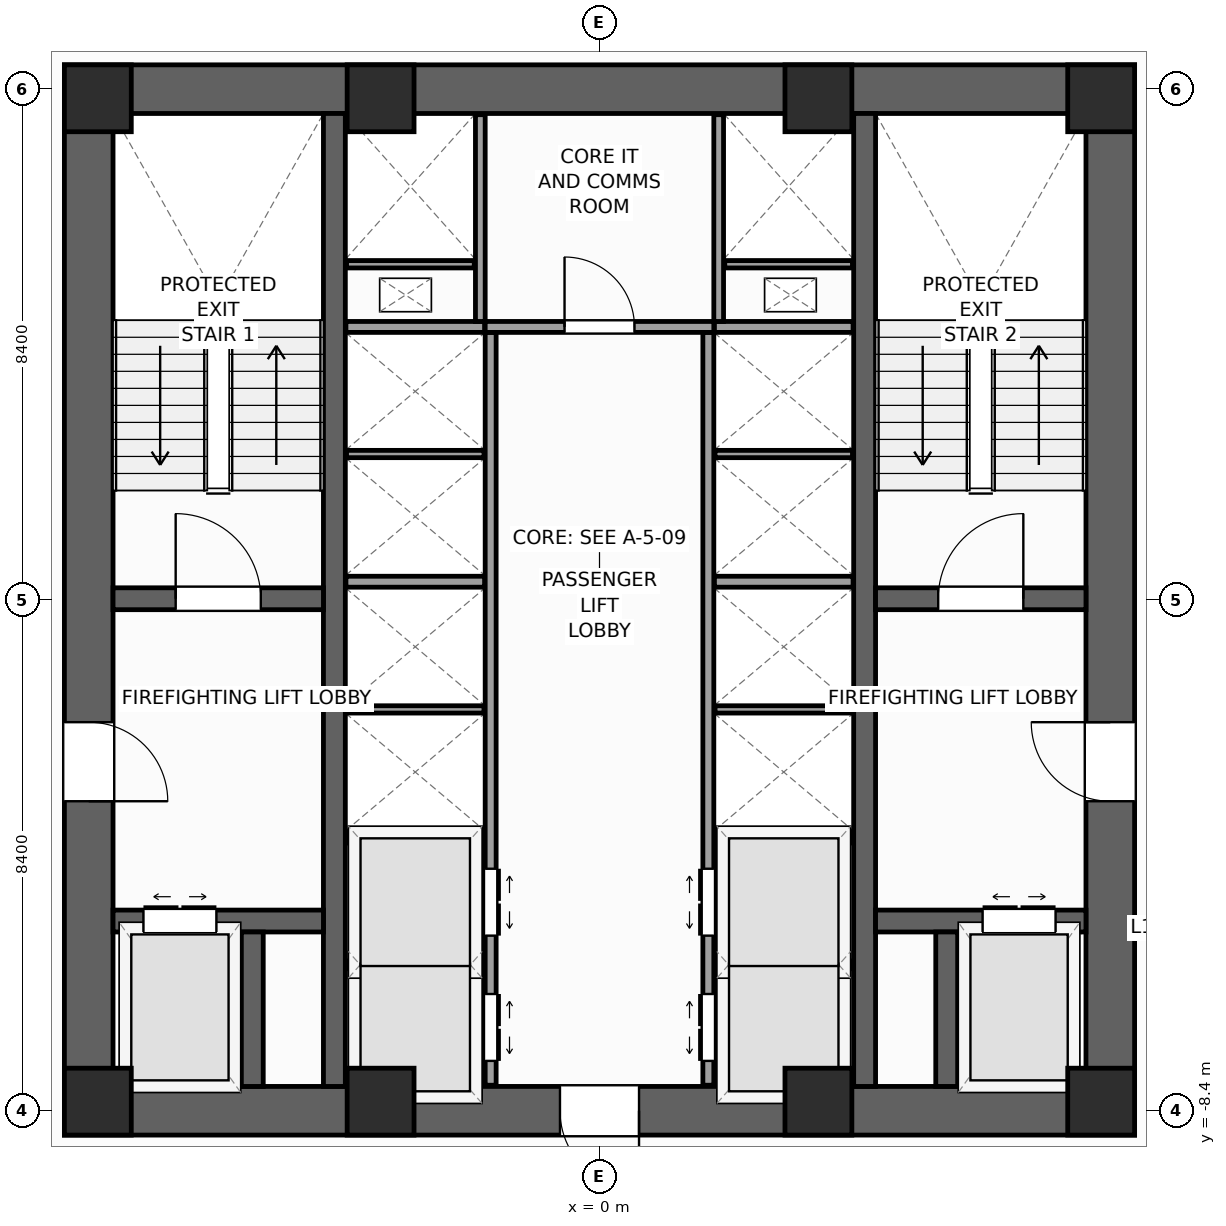
"""IFC4 building model, lengths in metres.
Left out: names, types, materials, properties, quantities, classifications, styles, units other than length and angle.
Written with IfcOpenShell. Run it as: python <this file> out.ifc"""

import sys

from ifc_helpers import new_model, si_unit, direction, frame, frame_2d, origin, origin_2d, place, context, subcontext, project, spatial, rectangle, extrude, source, transform, mapped, element, fill, save


model = new_model("IFC4")
c1 = context("Model", 3, precision=1e-05, world=origin(), true_north=direction((0.0, 1.0)))
c2 = subcontext(c1, "Body", "Model", "MODEL_VIEW")
j1 = project(units=[si_unit("LENGTHUNIT", "METRE"), si_unit("PLANEANGLEUNIT", "RADIAN")], contexts=[c1])
p1 = place(None, origin())
s1 = spatial("IfcSite", under=j1, at=p1, CompositionType="ELEMENT")
p2 = place(p1, origin())
s2 = spatial("IfcBuilding", under=s1, at=p2, CompositionType="ELEMENT")
p3 = place(p2, frame((0.0, 0.0, 58.0)))
s3 = spatial("IfcBuildingStorey", under=s2, at=p3, CompositionType="ELEMENT", Elevation=58.0)
p4 = place(p3, frame((-8.8, -8.4, 0.0), z_axis=(0.0, 0.0, 1.0), x_axis=(1.0, 0.0, 0.0)))
e1 = element("IfcWall", 1, at=p4, inside=s3, PredefinedType="SHEAR", context=c2, shape_type="SweptSolid", body=[
    extrude(rectangle(XDim=17.6, YDim=0.8, at=frame_2d((8.8, 0.0))), origin(), (0.0, 0.0, 1.0), 4.0),
])
p5 = place(p4, frame((8.15, 0.0, 0.0)))
e2 = element("IfcOpeningElement", 2, at=p5, cuts=e1, PredefinedType="OPENING", context=c2, shape_type="SweptSolid", body=[
    extrude(rectangle(XDim=1.3, YDim=2.2, at=frame_2d((0.65, 1.1))), frame((0.0, 0.41, 0.0), z_axis=(0.0, -1.0, 0.0), x_axis=(1.0, 0.0, 0.0)), (0.0, 0.0, 1.0), 0.82),
])
p6 = place(p3, frame((-8.8, 8.4, 0.0), z_axis=(0.0, 0.0, 1.0), x_axis=(1.0, 0.0, 0.0)))
e3 = element("IfcWall", 3, at=p6, inside=s3, PredefinedType="SHEAR", context=c2, shape_type="SweptSolid", body=[
    extrude(rectangle(XDim=17.6, YDim=0.8, at=frame_2d((8.8, 0.0))), origin(), (0.0, 0.0, 1.0), 4.0),
])
p7 = place(p3, frame((-8.4, -8.0, 0.0), z_axis=(0.0, 0.0, 1.0), x_axis=(0.0, 1.0, 0.0)))
e4 = element("IfcWall", 4, at=p7, inside=s3, PredefinedType="SHEAR", context=c2, shape_type="SweptSolid", body=[
    extrude(rectangle(XDim=16.0, YDim=0.8, at=frame_2d((8.0, 0.0))), origin(), (0.0, 0.0, 1.0), 4.0),
])
p8 = place(p7, frame((4.69, 0.0, 0.0)))
e5 = element("IfcOpeningElement", 5, at=p8, cuts=e4, PredefinedType="OPENING", context=c2, shape_type="SweptSolid", body=[
    extrude(rectangle(XDim=1.3, YDim=2.2, at=frame_2d((0.65, 1.1))), frame((0.0, 0.41, 0.0), z_axis=(0.0, -1.0, 0.0), x_axis=(1.0, 0.0, 0.0)), (0.0, 0.0, 1.0), 0.82),
])
p9 = place(p3, frame((8.4, -8.0, 0.0), z_axis=(0.0, 0.0, 1.0), x_axis=(0.0, 1.0, 0.0)))
e6 = element("IfcWall", 6, at=p9, inside=s3, PredefinedType="SHEAR", context=c2, shape_type="SweptSolid", body=[
    extrude(rectangle(XDim=16.0, YDim=0.8, at=frame_2d((8.0, 0.0))), origin(), (0.0, 0.0, 1.0), 4.0),
])
p10 = place(p9, frame((4.69, 0.0, 0.0)))
e7 = element("IfcOpeningElement", 7, at=p10, cuts=e6, PredefinedType="OPENING", context=c2, shape_type="SweptSolid", body=[
    extrude(rectangle(XDim=1.3, YDim=2.2, at=frame_2d((0.65, 1.1))), frame((0.0, 0.41, 0.0), z_axis=(0.0, -1.0, 0.0), x_axis=(1.0, 0.0, 0.0)), (0.0, 0.0, 1.0), 0.82),
])
for number, where, z_axis, x_axis in (
    (8, (-4.36, -8.0, 0.0), (0.0, 0.0, 1.0), (0.0, 1.0, 0.0)),
    (9, (4.36, -8.0, 0.0), (0.0, 0.0, 1.0), (0.0, 1.0, 0.0)),
):
    element("IfcWall", number, at=place(p3, frame(where, z_axis=z_axis, x_axis=x_axis)), inside=s3, PredefinedType="SHEAR", context=c2, shape_type="SweptSolid", body=[
        extrude(rectangle(XDim=16.0, YDim=0.36, at=frame_2d((8.0, 0.0))), origin(), (0.0, 0.0, 1.0), 4.0),
    ])
p11 = place(p3, frame((-8.0, 0.02, 0.0), z_axis=(0.0, 0.0, 1.0), x_axis=(1.0, 0.0, 0.0)))
e10 = element("IfcWall", 10, at=p11, inside=s3, PredefinedType="SHEAR", context=c2, shape_type="SweptSolid", body=[
    extrude(rectangle(XDim=3.46, YDim=0.36, at=frame_2d((1.73, 0.0))), origin(), (0.0, 0.0, 1.0), 4.0),
])
p12 = place(p11, frame((1.03, 0.0, 0.0)))
e11 = element("IfcOpeningElement", 11, at=p12, cuts=e10, PredefinedType="OPENING", context=c2, shape_type="SweptSolid", body=[
    extrude(rectangle(XDim=1.4, YDim=2.2, at=frame_2d((0.7, 1.1))), frame((0.0, 0.19, 0.0), z_axis=(0.0, -1.0, 0.0), x_axis=(1.0, 0.0, 0.0)), (0.0, 0.0, 1.0), 0.38),
])
p13 = place(p3, frame((4.54, 0.02, 0.0), z_axis=(0.0, 0.0, 1.0), x_axis=(1.0, 0.0, 0.0)))
e12 = element("IfcWall", 12, at=p13, inside=s3, PredefinedType="SHEAR", context=c2, shape_type="SweptSolid", body=[
    extrude(rectangle(XDim=3.46, YDim=0.36, at=frame_2d((1.73, 0.0))), origin(), (0.0, 0.0, 1.0), 4.0),
])
p14 = place(p13, frame((1.03, 0.0, 0.0)))
e13 = element("IfcOpeningElement", 13, at=p14, cuts=e12, PredefinedType="OPENING", context=c2, shape_type="SweptSolid", body=[
    extrude(rectangle(XDim=1.4, YDim=2.2, at=frame_2d((0.7, 1.1))), frame((0.0, 0.19, 0.0), z_axis=(0.0, -1.0, 0.0), x_axis=(1.0, 0.0, 0.0)), (0.0, 0.0, 1.0), 0.38),
])
p15 = place(p3, frame((-8.0, -5.28, 0.0), z_axis=(0.0, 0.0, 1.0), x_axis=(1.0, 0.0, 0.0)))
e14 = element("IfcWall", 14, at=p15, inside=s3, PredefinedType="SHEAR", context=c2, shape_type="SweptSolid", body=[
    extrude(rectangle(XDim=3.46, YDim=0.36, at=frame_2d((1.73, 0.0))), origin(), (0.0, 0.0, 1.0), 4.0),
])
p16 = place(p15, frame((0.5, 0.0, 0.0)))
e15 = element("IfcOpeningElement", 15, at=p16, cuts=e14, PredefinedType="OPENING", context=c2, shape_type="SweptSolid", body=[
    extrude(rectangle(XDim=1.2, YDim=2.25, at=frame_2d((0.6, 1.125))), frame((0.0, 0.19, 0.0), z_axis=(0.0, -1.0, 0.0), x_axis=(1.0, 0.0, 0.0)), (0.0, 0.0, 1.0), 0.38),
])
p17 = place(p3, frame((4.54, -5.28, 0.0), z_axis=(0.0, 0.0, 1.0), x_axis=(1.0, 0.0, 0.0)))
e16 = element("IfcWall", 16, at=p17, inside=s3, PredefinedType="SHEAR", context=c2, shape_type="SweptSolid", body=[
    extrude(rectangle(XDim=3.46, YDim=0.36, at=frame_2d((1.73, 0.0))), origin(), (0.0, 0.0, 1.0), 4.0),
])
p18 = place(p17, frame((1.76, 0.0, 0.0)))
e17 = element("IfcOpeningElement", 17, at=p18, cuts=e16, PredefinedType="OPENING", context=c2, shape_type="SweptSolid", body=[
    extrude(rectangle(XDim=1.2, YDim=2.25, at=frame_2d((0.6, 1.125))), frame((0.0, 0.19, 0.0), z_axis=(0.0, -1.0, 0.0), x_axis=(1.0, 0.0, 0.0)), (0.0, 0.0, 1.0), 0.38),
])
for number, where, z_axis, x_axis in (
    (18, (-5.71, -8.0, 0.0), (0.0, 0.0, 1.0), (0.0, 1.0, 0.0)),
    (19, (5.71, -8.0, 0.0), (0.0, 0.0, 1.0), (0.0, 1.0, 0.0)),
):
    element("IfcWall", number, at=place(p3, frame(where, z_axis=z_axis, x_axis=x_axis)), inside=s3, PredefinedType="SHEAR", context=c2, shape_type="SweptSolid", body=[
        extrude(rectangle(XDim=2.54, YDim=0.36, at=frame_2d((1.27, 0.0))), origin(), (0.0, 0.0, 1.0), 4.0),
    ])
m1 = source(origin(), c2, "Body", "SweptSolid", [
    extrude(rectangle(XDim=1.1, YDim=1.1, at=origin_2d()), origin(), (0.0, 0.0, 1.0), 4.0),
])
for number, where, z_axis, x_axis in (
    (20, (-8.25, -8.25, 0.0), (0.0, 0.0, 1.0), (1.0, 0.0, 0.0)),
    (21, (8.25, -8.25, 0.0), (0.0, 0.0, 1.0), (1.0, 0.0, 0.0)),
    (22, (8.25, 8.25, 0.0), (0.0, 0.0, 1.0), (1.0, 0.0, 0.0)),
    (23, (-8.25, 8.25, 0.0), (0.0, 0.0, 1.0), (1.0, 0.0, 0.0)),
    (24, (-3.6, -8.25, 0.0), (0.0, 0.0, 1.0), (1.0, 0.0, 0.0)),
    (25, (3.6, -8.25, 0.0), (0.0, 0.0, 1.0), (1.0, 0.0, 0.0)),
    (26, (-3.6, 8.25, 0.0), (0.0, 0.0, 1.0), (1.0, 0.0, 0.0)),
    (27, (3.6, 8.25, 0.0), (0.0, 0.0, 1.0), (1.0, 0.0, 0.0)),
):
    element("IfcColumn", number, at=place(p3, frame(where, z_axis=z_axis, x_axis=x_axis)), inside=s3, PredefinedType="PILASTER", context=c2, shape_type="MappedRepresentation", body=[
        mapped(m1, transform((0.0, 0.0, 0.0), scale=1.0)),
    ])
p19 = place(p3, frame((-1.79, -7.98, 0.0), z_axis=(0.0, 0.0, 1.0), x_axis=(0.0, 1.0, 0.0)))
e28 = element("IfcWall", 28, at=p19, inside=s3, PredefinedType="PARTITIONING", context=c2, shape_type="SweptSolid", body=[
    extrude(rectangle(XDim=12.38, YDim=0.18, at=frame_2d((6.19, 0.0))), origin(), (0.0, 0.0, 1.0), 3.72),
])
p20 = place(p19, frame((0.4, 0.0, 0.0)))
e29 = element("IfcOpeningElement", 29, at=p20, cuts=e28, PredefinedType="OPENING", context=c2, shape_type="SweptSolid", body=[
    extrude(rectangle(XDim=1.1, YDim=2.2, at=frame_2d((0.55, 1.1))), frame((0.0, 0.1, 0.0), z_axis=(0.0, -1.0, 0.0), x_axis=(1.0, 0.0, 0.0)), (0.0, 0.0, 1.0), 0.2),
])
p21 = place(p19, frame((2.46, 0.0, 0.0)))
e30 = element("IfcOpeningElement", 30, at=p21, cuts=e28, PredefinedType="OPENING", context=c2, shape_type="SweptSolid", body=[
    extrude(rectangle(XDim=1.1, YDim=2.2, at=frame_2d((0.55, 1.1))), frame((0.0, 0.1, 0.0), z_axis=(0.0, -1.0, 0.0), x_axis=(1.0, 0.0, 0.0)), (0.0, 0.0, 1.0), 0.2),
])
p22 = place(p3, frame((1.79, -7.98, 0.0), z_axis=(0.0, 0.0, 1.0), x_axis=(0.0, 1.0, 0.0)))
e31 = element("IfcWall", 31, at=p22, inside=s3, PredefinedType="PARTITIONING", context=c2, shape_type="SweptSolid", body=[
    extrude(rectangle(XDim=12.38, YDim=0.18, at=frame_2d((6.19, 0.0))), origin(), (0.0, 0.0, 1.0), 3.72),
])
p23 = place(p22, frame((0.4, 0.0, 0.0)))
e32 = element("IfcOpeningElement", 32, at=p23, cuts=e31, PredefinedType="OPENING", context=c2, shape_type="SweptSolid", body=[
    extrude(rectangle(XDim=1.1, YDim=2.2, at=frame_2d((0.55, 1.1))), frame((0.0, 0.1, 0.0), z_axis=(0.0, -1.0, 0.0), x_axis=(1.0, 0.0, 0.0)), (0.0, 0.0, 1.0), 0.2),
])
p24 = place(p22, frame((2.46, 0.0, 0.0)))
e33 = element("IfcOpeningElement", 33, at=p24, cuts=e31, PredefinedType="OPENING", context=c2, shape_type="SweptSolid", body=[
    extrude(rectangle(XDim=1.1, YDim=2.2, at=frame_2d((0.55, 1.1))), frame((0.0, 0.1, 0.0), z_axis=(0.0, -1.0, 0.0), x_axis=(1.0, 0.0, 0.0)), (0.0, 0.0, 1.0), 0.2),
])
p25 = place(p3, frame((-1.88, 4.49, 0.0), z_axis=(0.0, 0.0, 1.0), x_axis=(1.0, 0.0, 0.0)))
e34 = element("IfcWall", 34, at=p25, inside=s3, PredefinedType="PARTITIONING", context=c2, shape_type="SweptSolid", body=[
    extrude(rectangle(XDim=3.76, YDim=0.18, at=frame_2d((1.88, 0.0))), origin(), (0.0, 0.0, 1.0), 3.72),
])
p26 = place(p25, frame((1.305, 0.0, 0.0)))
e35 = element("IfcOpeningElement", 35, at=p26, cuts=e34, PredefinedType="OPENING", context=c2, shape_type="SweptSolid", body=[
    extrude(rectangle(XDim=1.15, YDim=2.25, at=frame_2d((0.575, 1.125))), frame((0.0, 0.1, 0.0), z_axis=(0.0, -1.0, 0.0), x_axis=(1.0, 0.0, 0.0)), (0.0, 0.0, 1.0), 0.2),
])
for number, where, z_axis, x_axis in (
    (36, (-4.17, -3.9, 0.0), (0.0, 0.0, 1.0), (1.0, 0.0, 0.0)),
    (37, (1.89, -3.9, 0.0), (0.0, 0.0, 1.0), (1.0, 0.0, 0.0)),
    (38, (-4.17, 0.3, 0.0), (0.0, 0.0, 1.0), (1.0, 0.0, 0.0)),
    (39, (1.89, 0.3, 0.0), (0.0, 0.0, 1.0), (1.0, 0.0, 0.0)),
    (40, (-4.17, 4.49, 0.0), (0.0, 0.0, 1.0), (1.0, 0.0, 0.0)),
    (41, (1.89, 4.49, 0.0), (0.0, 0.0, 1.0), (1.0, 0.0, 0.0)),
):
    element("IfcWall", number, at=place(p3, frame(where, z_axis=z_axis, x_axis=x_axis)), inside=s3, PredefinedType="PARTITIONING", context=c2, shape_type="SweptSolid", body=[
        extrude(rectangle(XDim=2.28, YDim=0.18, at=frame_2d((1.14, 0.0))), origin(), (0.0, 0.0, 1.0), 3.72),
    ])
for number, where, z_axis, x_axis in (
    (42, (-4.16, -6.0, 0.0), (0.0, 0.0, 1.0), (1.0, 0.0, 0.0)),
    (43, (1.9, -6.0, 0.0), (0.0, 0.0, 1.0), (1.0, 0.0, 0.0)),
    (44, (-4.16, -1.8, 0.0), (0.0, 0.0, 1.0), (1.0, 0.0, 0.0)),
    (45, (1.9, -1.8, 0.0), (0.0, 0.0, 1.0), (1.0, 0.0, 0.0)),
    (46, (-4.16, 2.4, 0.0), (0.0, 0.0, 1.0), (1.0, 0.0, 0.0)),
    (47, (1.9, 2.4, 0.0), (0.0, 0.0, 1.0), (1.0, 0.0, 0.0)),
):
    element("IfcWall", number, at=place(p3, frame(where, z_axis=z_axis, x_axis=x_axis)), inside=s3, PredefinedType="PARTITIONING", context=c2, shape_type="SweptSolid", body=[
        extrude(rectangle(XDim=2.26, YDim=0.12, at=frame_2d((1.13, 0.0))), origin(), (0.0, 0.0, 1.0), 3.72),
    ])
for number, where, z_axis, x_axis in (
    (48, (-1.96, 4.58, 0.0), (0.0, 0.0, 1.0), (0.0, 1.0, 0.0)),
    (49, (1.96, 4.58, 0.0), (0.0, 0.0, 1.0), (0.0, 1.0, 0.0)),
):
    element("IfcWall", number, at=place(p3, frame(where, z_axis=z_axis, x_axis=x_axis)), inside=s3, PredefinedType="PARTITIONING", context=c2, shape_type="SweptSolid", body=[
        extrude(rectangle(XDim=3.4, YDim=0.16, at=frame_2d((1.7, 0.0))), origin(), (0.0, 0.0, 1.0), 3.72),
    ])
for number, where, z_axis, x_axis in (
    (50, (-4.16, 5.52, 0.0), (0.0, 0.0, 1.0), (1.0, 0.0, 0.0)),
    (51, (2.06, 5.52, 0.0), (0.0, 0.0, 1.0), (1.0, 0.0, 0.0)),
):
    element("IfcWall", number, at=place(p3, frame(where, z_axis=z_axis, x_axis=x_axis)), inside=s3, PredefinedType="PARTITIONING", context=c2, shape_type="SweptSolid", body=[
        extrude(rectangle(XDim=2.1, YDim=0.12, at=frame_2d((1.05, 0.0))), origin(), (0.0, 0.0, 1.0), 3.72),
    ])
m2 = source(origin(), c2, "Body", "SweptSolid", [
    extrude(rectangle(XDim=1.4, YDim=2.2, at=frame_2d((0.7, 1.1))), frame((0.0, 0.025, 0.0), z_axis=(0.0, -1.0, 0.0), x_axis=(1.0, 0.0, 0.0)), (0.0, 0.0, 1.0), 0.05),
])
p27 = place(p12, origin())
e52 = element("IfcDoor", 52, at=p27, inside=s3, OperationType="SINGLE_SWING_LEFT", PredefinedType="DOOR", context=c2, shape_type="MappedRepresentation", body=[
    mapped(m2, transform((0.0, 0.0, 0.0), scale=1.0)),
])
fill(e11, e52)
p28 = place(p14, origin())
e53 = element("IfcDoor", 53, at=p28, inside=s3, OperationType="SINGLE_SWING_RIGHT", PredefinedType="DOOR", context=c2, shape_type="MappedRepresentation", body=[
    mapped(m2, transform((0.0, 0.0, 0.0), scale=1.0)),
])
fill(e13, e53)
m3 = source(origin(), c2, "Body", "SweptSolid", [
    extrude(rectangle(XDim=1.3, YDim=2.2, at=frame_2d((0.65, 1.1))), frame((0.0, 0.025, 0.0), z_axis=(0.0, -1.0, 0.0), x_axis=(1.0, 0.0, 0.0)), (0.0, 0.0, 1.0), 0.05),
])
p29 = place(p8, frame((1.3, 0.0, 0.0), z_axis=(0.0, 0.0, 1.0), x_axis=(-1.0, 0.0, 0.0)))
e54 = element("IfcDoor", 54, at=p29, inside=s3, OperationType="SINGLE_SWING_LEFT", PredefinedType="DOOR", context=c2, shape_type="MappedRepresentation", body=[
    mapped(m3, transform((0.0, 0.0, 0.0), scale=1.0)),
])
fill(e5, e54)
p30 = place(p10, origin())
e55 = element("IfcDoor", 55, at=p30, inside=s3, OperationType="SINGLE_SWING_RIGHT", PredefinedType="DOOR", context=c2, shape_type="MappedRepresentation", body=[
    mapped(m3, transform((0.0, 0.0, 0.0), scale=1.0)),
])
fill(e7, e55)
p31 = place(p5, frame((1.3, 0.0, 0.0), z_axis=(0.0, 0.0, 1.0), x_axis=(-1.0, 0.0, 0.0)))
e56 = element("IfcDoor", 56, at=p31, inside=s3, OperationType="SINGLE_SWING_RIGHT", PredefinedType="DOOR", context=c2, shape_type="MappedRepresentation", body=[
    mapped(m3, transform((0.0, 0.0, 0.0), scale=1.0)),
])
fill(e2, e56)
m4 = source(origin(), c2, "Body", "SweptSolid", [
    extrude(rectangle(XDim=1.2, YDim=2.25, at=frame_2d((0.6, 1.125))), frame((0.0, 0.025, 0.0), z_axis=(0.0, -1.0, 0.0), x_axis=(1.0, 0.0, 0.0)), (0.0, 0.0, 1.0), 0.05),
])
p32 = place(p16, origin())
e57 = element("IfcDoor", 57, at=p32, inside=s3, OperationType="DOUBLE_DOOR_SLIDING", PredefinedType="DOOR", context=c2, shape_type="MappedRepresentation", body=[
    mapped(m4, transform((0.0, 0.0, 0.0), scale=1.0)),
])
fill(e15, e57)
p33 = place(p18, origin())
e58 = element("IfcDoor", 58, at=p33, inside=s3, OperationType="DOUBLE_DOOR_SLIDING", PredefinedType="DOOR", context=c2, shape_type="MappedRepresentation", body=[
    mapped(m4, transform((0.0, 0.0, 0.0), scale=1.0)),
])
fill(e17, e58)
m5 = source(origin(), c2, "Body", "SweptSolid", [
    extrude(rectangle(XDim=1.1, YDim=2.2, at=frame_2d((0.55, 1.1))), frame((0.0, 0.025, 0.0), z_axis=(0.0, -1.0, 0.0), x_axis=(1.0, 0.0, 0.0)), (0.0, 0.0, 1.0), 0.05),
])
p34 = place(p20, frame((1.1, 0.0, 0.0), z_axis=(0.0, 0.0, 1.0), x_axis=(-1.0, 0.0, 0.0)))
e59 = element("IfcDoor", 59, at=p34, inside=s3, OperationType="DOUBLE_DOOR_SLIDING", PredefinedType="DOOR", context=c2, shape_type="MappedRepresentation", body=[
    mapped(m5, transform((0.0, 0.0, 0.0), scale=1.0)),
])
fill(e29, e59)
p35 = place(p21, frame((1.1, 0.0, 0.0), z_axis=(0.0, 0.0, 1.0), x_axis=(-1.0, 0.0, 0.0)))
e60 = element("IfcDoor", 60, at=p35, inside=s3, OperationType="DOUBLE_DOOR_SLIDING", PredefinedType="DOOR", context=c2, shape_type="MappedRepresentation", body=[
    mapped(m5, transform((0.0, 0.0, 0.0), scale=1.0)),
])
fill(e30, e60)
p36 = place(p23, origin())
e61 = element("IfcDoor", 61, at=p36, inside=s3, OperationType="DOUBLE_DOOR_SLIDING", PredefinedType="DOOR", context=c2, shape_type="MappedRepresentation", body=[
    mapped(m5, transform((0.0, 0.0, 0.0), scale=1.0)),
])
fill(e32, e61)
p37 = place(p24, origin())
e62 = element("IfcDoor", 62, at=p37, inside=s3, OperationType="DOUBLE_DOOR_SLIDING", PredefinedType="DOOR", context=c2, shape_type="MappedRepresentation", body=[
    mapped(m5, transform((0.0, 0.0, 0.0), scale=1.0)),
])
fill(e33, e62)
m6 = source(origin(), c2, "Body", "SweptSolid", [
    extrude(rectangle(XDim=1.15, YDim=2.25, at=frame_2d((0.575, 1.125))), frame((0.0, 0.025, 0.0), z_axis=(0.0, -1.0, 0.0), x_axis=(1.0, 0.0, 0.0)), (0.0, 0.0, 1.0), 0.05),
])
p38 = place(p26, origin())
e63 = element("IfcDoor", 63, at=p38, inside=s3, OperationType="SINGLE_SWING_LEFT", PredefinedType="DOOR", context=c2, shape_type="MappedRepresentation", body=[
    mapped(m6, transform((0.0, 0.0, 0.0), scale=1.0)),
])
fill(e35, e63)
save(model, sys.argv[1])
